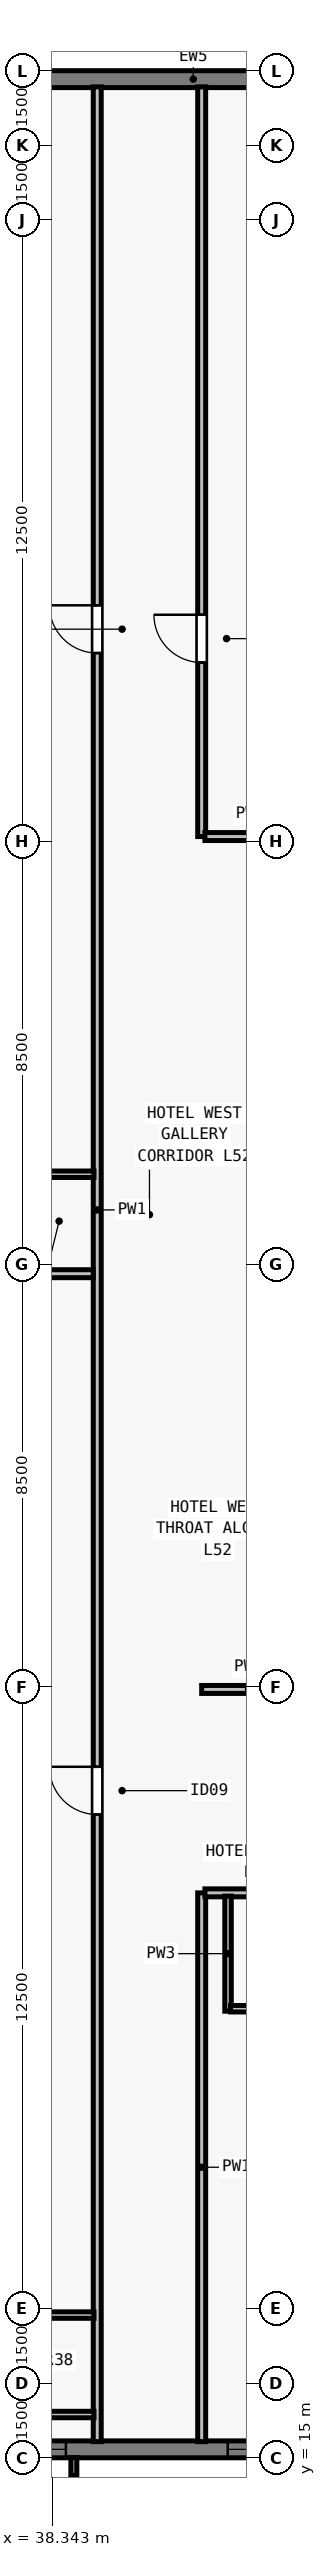
"""IFC4 building model, lengths in metres.
Left out: names, types, materials, properties, quantities, classifications, styles, units other than length and angle.
Written with IfcOpenShell. Run it as: python <this file> out.ifc"""

import sys

from ifc_helpers import new_model, si_unit, direction, frame, frame_2d, origin, place, context, subcontext, project, spatial, rectangle, extrude, element, fill, save


model = new_model("IFC4")
c1 = context("Model", 3, precision=1e-05, world=origin(), true_north=direction((0.0, 1.0)))
c2 = subcontext(c1, "Body", "Model", "MODEL_VIEW")
j1 = project(units=[si_unit("LENGTHUNIT", "METRE"), si_unit("PLANEANGLEUNIT", "RADIAN")], contexts=[c1])
p1 = place(None, origin())
s1 = spatial("IfcSite", under=j1, at=p1, CompositionType="ELEMENT")
p2 = place(p1, origin())
s2 = spatial("IfcBuilding", under=s1, at=p2, CompositionType="ELEMENT")
p3 = place(p2, frame((0.0, 0.0, 190.0)))
s3 = spatial("IfcBuildingStorey", under=s2, at=p3, CompositionType="ELEMENT", Elevation=190.0)
p4 = place(p3, frame((72.0, 15.17, 0.0), z_axis=(0.0, 0.0, 1.0), x_axis=(-1.0, 0.0, 0.0)))
e1 = element("IfcWall", 1, at=p4, inside=s3, PredefinedType="SOLIDWALL", context=c2, shape_type="SweptSolid", body=[
    extrude(rectangle(XDim=39.682, YDim=0.34, at=frame_2d((19.841, 0.0))), origin(), (0.0, 0.0, 1.0), 3.24),
])
p5 = place(p4, frame((4.502, 0.0, 0.8)))
e2 = element("IfcOpeningElement", 2, at=p5, cuts=e1, PredefinedType="OPENING", context=c2, shape_type="SweptSolid", body=[
    extrude(rectangle(XDim=1.35, YDim=1.62, at=frame_2d((0.675, 0.81))), frame((0.0, 0.18, 0.0), z_axis=(0.0, -1.0, 0.0), x_axis=(1.0, 0.0, 0.0)), (0.0, 0.0, 1.0), 0.36),
])
p6 = place(p4, frame((8.755, 0.0, 0.8)))
e3 = element("IfcOpeningElement", 3, at=p6, cuts=e1, PredefinedType="OPENING", context=c2, shape_type="SweptSolid", body=[
    extrude(rectangle(XDim=1.75, YDim=1.62, at=frame_2d((0.875, 0.81))), frame((0.0, 0.18, 0.0), z_axis=(0.0, -1.0, 0.0), x_axis=(1.0, 0.0, 0.0)), (0.0, 0.0, 1.0), 0.36),
])
p7 = place(p4, frame((12.059, 0.0, 0.8)))
e4 = element("IfcOpeningElement", 4, at=p7, cuts=e1, PredefinedType="OPENING", context=c2, shape_type="SweptSolid", body=[
    extrude(rectangle(XDim=1.35, YDim=1.62, at=frame_2d((0.675, 0.81))), frame((0.0, 0.18, 0.0), z_axis=(0.0, -1.0, 0.0), x_axis=(1.0, 0.0, 0.0)), (0.0, 0.0, 1.0), 0.36),
])
p8 = place(p4, frame((16.262, 0.0, 0.8)))
e5 = element("IfcOpeningElement", 5, at=p8, cuts=e1, PredefinedType="OPENING", context=c2, shape_type="SweptSolid", body=[
    extrude(rectangle(XDim=1.75, YDim=1.62, at=frame_2d((0.875, 0.81))), frame((0.0, 0.18, 0.0), z_axis=(0.0, -1.0, 0.0), x_axis=(1.0, 0.0, 0.0)), (0.0, 0.0, 1.0), 0.36),
])
p9 = place(p4, frame((20.016, 0.0, 0.8)))
e6 = element("IfcOpeningElement", 6, at=p9, cuts=e1, PredefinedType="OPENING", context=c2, shape_type="SweptSolid", body=[
    extrude(rectangle(XDim=1.35, YDim=1.62, at=frame_2d((0.675, 0.81))), frame((0.0, 0.18, 0.0), z_axis=(0.0, -1.0, 0.0), x_axis=(1.0, 0.0, 0.0)), (0.0, 0.0, 1.0), 0.36),
])
p10 = place(p4, frame((22.07, 0.0, 0.8)))
e7 = element("IfcOpeningElement", 7, at=p10, cuts=e1, PredefinedType="OPENING", context=c2, shape_type="SweptSolid", body=[
    extrude(rectangle(XDim=1.75, YDim=1.62, at=frame_2d((0.875, 0.81))), frame((0.0, 0.18, 0.0), z_axis=(0.0, -1.0, 0.0), x_axis=(1.0, 0.0, 0.0)), (0.0, 0.0, 1.0), 0.36),
])
p11 = place(p4, frame((26.273, 0.0, 0.8)))
e8 = element("IfcOpeningElement", 8, at=p11, cuts=e1, PredefinedType="OPENING", context=c2, shape_type="SweptSolid", body=[
    extrude(rectangle(XDim=1.35, YDim=1.62, at=frame_2d((0.675, 0.81))), frame((0.0, 0.18, 0.0), z_axis=(0.0, -1.0, 0.0), x_axis=(1.0, 0.0, 0.0)), (0.0, 0.0, 1.0), 0.36),
])
p12 = place(p4, frame((28.377, 0.0, 0.8)))
e9 = element("IfcOpeningElement", 9, at=p12, cuts=e1, PredefinedType="OPENING", context=c2, shape_type="SweptSolid", body=[
    extrude(rectangle(XDim=1.75, YDim=1.62, at=frame_2d((0.875, 0.81))), frame((0.0, 0.18, 0.0), z_axis=(0.0, -1.0, 0.0), x_axis=(1.0, 0.0, 0.0)), (0.0, 0.0, 1.0), 0.36),
])
p13 = place(p4, frame((33.38, 0.0, 0.8)))
e10 = element("IfcOpeningElement", 10, at=p13, cuts=e1, PredefinedType="OPENING", context=c2, shape_type="SweptSolid", body=[
    extrude(rectangle(XDim=1.35, YDim=1.62, at=frame_2d((0.675, 0.81))), frame((0.0, 0.18, 0.0), z_axis=(0.0, -1.0, 0.0), x_axis=(1.0, 0.0, 0.0)), (0.0, 0.0, 1.0), 0.36),
])
p14 = place(p3, frame((32.0, 62.83, 0.0), z_axis=(0.0, 0.0, 1.0), x_axis=(1.0, 0.0, 0.0)))
e11 = element("IfcWall", 11, at=p14, inside=s3, PredefinedType="SOLIDWALL", context=c2, shape_type="SweptSolid", body=[
    extrude(rectangle(XDim=39.682, YDim=0.34, at=frame_2d((19.841, 0.0))), origin(), (0.0, 0.0, 1.0), 3.24),
])
p15 = place(p14, frame((4.952, 0.0, 0.8)))
e12 = element("IfcOpeningElement", 12, at=p15, cuts=e11, PredefinedType="OPENING", context=c2, shape_type="SweptSolid", body=[
    extrude(rectangle(XDim=1.35, YDim=1.62, at=frame_2d((0.675, 0.81))), frame((0.0, 0.18, 0.0), z_axis=(0.0, -1.0, 0.0), x_axis=(1.0, 0.0, 0.0)), (0.0, 0.0, 1.0), 0.36),
])
p16 = place(p14, frame((12.059, 0.0, 0.8)))
e13 = element("IfcOpeningElement", 13, at=p16, cuts=e11, PredefinedType="OPENING", context=c2, shape_type="SweptSolid", body=[
    extrude(rectangle(XDim=1.35, YDim=1.62, at=frame_2d((0.675, 0.81))), frame((0.0, 0.18, 0.0), z_axis=(0.0, -1.0, 0.0), x_axis=(1.0, 0.0, 0.0)), (0.0, 0.0, 1.0), 0.36),
])
p17 = place(p14, frame((16.262, 0.0, 0.8)))
e14 = element("IfcOpeningElement", 14, at=p17, cuts=e11, PredefinedType="OPENING", context=c2, shape_type="SweptSolid", body=[
    extrude(rectangle(XDim=1.75, YDim=1.62, at=frame_2d((0.875, 0.81))), frame((0.0, 0.18, 0.0), z_axis=(0.0, -1.0, 0.0), x_axis=(1.0, 0.0, 0.0)), (0.0, 0.0, 1.0), 0.36),
])
p18 = place(p14, frame((19.166, 0.0, 0.8)))
e15 = element("IfcOpeningElement", 15, at=p18, cuts=e11, PredefinedType="OPENING", context=c2, shape_type="SweptSolid", body=[
    extrude(rectangle(XDim=1.35, YDim=1.62, at=frame_2d((0.675, 0.81))), frame((0.0, 0.18, 0.0), z_axis=(0.0, -1.0, 0.0), x_axis=(1.0, 0.0, 0.0)), (0.0, 0.0, 1.0), 0.36),
])
p19 = place(p14, frame((22.07, 0.0, 0.8)))
e16 = element("IfcOpeningElement", 16, at=p19, cuts=e11, PredefinedType="OPENING", context=c2, shape_type="SweptSolid", body=[
    extrude(rectangle(XDim=1.75, YDim=1.62, at=frame_2d((0.875, 0.81))), frame((0.0, 0.18, 0.0), z_axis=(0.0, -1.0, 0.0), x_axis=(1.0, 0.0, 0.0)), (0.0, 0.0, 1.0), 0.36),
])
p20 = place(p14, frame((26.273, 0.0, 0.8)))
e17 = element("IfcOpeningElement", 17, at=p20, cuts=e11, PredefinedType="OPENING", context=c2, shape_type="SweptSolid", body=[
    extrude(rectangle(XDim=1.35, YDim=1.62, at=frame_2d((0.675, 0.81))), frame((0.0, 0.18, 0.0), z_axis=(0.0, -1.0, 0.0), x_axis=(1.0, 0.0, 0.0)), (0.0, 0.0, 1.0), 0.36),
])
p21 = place(p14, frame((29.177, 0.0, 0.8)))
e18 = element("IfcOpeningElement", 18, at=p21, cuts=e11, PredefinedType="OPENING", context=c2, shape_type="SweptSolid", body=[
    extrude(rectangle(XDim=1.75, YDim=1.62, at=frame_2d((0.875, 0.81))), frame((0.0, 0.18, 0.0), z_axis=(0.0, -1.0, 0.0), x_axis=(1.0, 0.0, 0.0)), (0.0, 0.0, 1.0), 0.36),
])
p22 = place(p14, frame((34.23, 0.0, 0.8)))
e19 = element("IfcOpeningElement", 19, at=p22, cuts=e11, PredefinedType="OPENING", context=c2, shape_type="SweptSolid", body=[
    extrude(rectangle(XDim=1.35, YDim=1.62, at=frame_2d((0.675, 0.81))), frame((0.0, 0.18, 0.0), z_axis=(0.0, -1.0, 0.0), x_axis=(1.0, 0.0, 0.0)), (0.0, 0.0, 1.0), 0.36),
])
p23 = place(p3, frame((39.25, 15.325, 0.0), z_axis=(0.0, 0.0, 1.0), x_axis=(0.0, 1.0, 0.0)))
e20 = element("IfcWall", 20, at=p23, inside=s3, PredefinedType="PARTITIONING", context=c2, shape_type="SweptSolid", body=[
    extrude(rectangle(XDim=47.35, YDim=0.16, at=frame_2d((23.675, 0.0))), origin(), (0.0, 0.0, 1.0), 2.515),
])
p24 = place(p23, frame((12.61, 0.0, 0.0)))
e21 = element("IfcOpeningElement", 21, at=p24, cuts=e20, PredefinedType="OPENING", context=c2, shape_type="SweptSolid", body=[
    extrude(rectangle(XDim=0.96, YDim=2.15, at=frame_2d((0.48, 1.075))), frame((0.0, 0.09, 0.0), z_axis=(0.0, -1.0, 0.0), x_axis=(1.0, 0.0, 0.0)), (0.0, 0.0, 1.0), 0.18),
])
p25 = place(p23, frame((35.965, 0.0, 0.0)))
e22 = element("IfcOpeningElement", 22, at=p25, cuts=e20, PredefinedType="OPENING", context=c2, shape_type="SweptSolid", body=[
    extrude(rectangle(XDim=0.96, YDim=2.15, at=frame_2d((0.48, 1.075))), frame((0.0, 0.09, 0.0), z_axis=(0.0, -1.0, 0.0), x_axis=(1.0, 0.0, 0.0)), (0.0, 0.0, 1.0), 0.18),
])
p26 = place(p3, frame((41.35, 15.325, 0.0), z_axis=(0.0, 0.0, 1.0), x_axis=(0.0, 1.0, 0.0)))
e23 = element("IfcWall", 23, at=p26, inside=s3, PredefinedType="PARTITIONING", context=c2, shape_type="SweptSolid", body=[
    extrude(rectangle(XDim=11.035, YDim=0.16, at=frame_2d((5.518, 0.0))), origin(), (0.0, 0.0, 1.0), 3.24),
])
p27 = place(p3, frame((41.35, 47.6, 0.0), z_axis=(0.0, 0.0, 1.0), x_axis=(0.0, 1.0, 0.0)))
e24 = element("IfcWall", 24, at=p27, inside=s3, PredefinedType="PARTITIONING", context=c2, shape_type="SweptSolid", body=[
    extrude(rectangle(XDim=15.075, YDim=0.16, at=frame_2d((7.538, 0.0))), origin(), (0.0, 0.0, 1.0), 2.515),
])
p28 = place(p27, frame((3.5, 0.0, 0.0)))
e25 = element("IfcOpeningElement", 25, at=p28, cuts=e24, PredefinedType="OPENING", context=c2, shape_type="SweptSolid", body=[
    extrude(rectangle(XDim=0.96, YDim=2.12, at=frame_2d((0.48, 1.06))), frame((0.0, 0.09, 0.0), z_axis=(0.0, -1.0, 0.0), x_axis=(1.0, 0.0, 0.0)), (0.0, 0.0, 1.0), 0.18),
])
p29 = place(p3, frame((41.35, 30.45, 0.0), z_axis=(0.0, 0.0, 1.0), x_axis=(1.0, 0.0, 0.0)))
e26 = element("IfcWall", 26, at=p29, inside=s3, PredefinedType="PARTITIONING", context=c2, shape_type="SweptSolid", body=[
    extrude(rectangle(XDim=1.885, YDim=0.16, at=frame_2d((0.942, 0.0))), origin(), (0.0, 0.0, 1.0), 3.24),
])
p30 = place(p3, frame((41.415, 47.6, 0.0), z_axis=(0.0, 0.0, 1.0), x_axis=(1.0, 0.0, 0.0)))
e27 = element("IfcWall", 27, at=p30, inside=s3, PredefinedType="PARTITIONING", context=c2, shape_type="SweptSolid", body=[
    extrude(rectangle(XDim=1.82, YDim=0.16, at=frame_2d((0.91, 0.0))), origin(), (0.0, 0.0, 1.0), 3.24),
])
p31 = place(p3, frame((41.415, 26.36, 0.0), z_axis=(0.0, 0.0, 1.0), x_axis=(1.0, 0.0, 0.0)))
e28 = element("IfcWall", 28, at=p31, inside=s3, PredefinedType="PARTITIONING", context=c2, shape_type="SweptSolid", body=[
    extrude(rectangle(XDim=22.07, YDim=0.16, at=frame_2d((11.035, 0.0))), origin(), (0.0, 0.0, 1.0), 3.24),
])
p32 = place(p31, frame((3.331, 0.0, 0.0)))
e29 = element("IfcOpeningElement", 29, at=p32, cuts=e28, PredefinedType="OPENING", context=c2, shape_type="SweptSolid", body=[
    extrude(rectangle(XDim=0.96, YDim=2.15, at=frame_2d((0.48, 1.075))), frame((0.0, 0.09, 0.0), z_axis=(0.0, -1.0, 0.0), x_axis=(1.0, 0.0, 0.0)), (0.0, 0.0, 1.0), 0.18),
])
p33 = place(p31, frame((8.83, 0.0, 0.0)))
e30 = element("IfcOpeningElement", 30, at=p33, cuts=e28, PredefinedType="OPENING", context=c2, shape_type="SweptSolid", body=[
    extrude(rectangle(XDim=0.96, YDim=2.15, at=frame_2d((0.48, 1.075))), frame((0.0, 0.09, 0.0), z_axis=(0.0, -1.0, 0.0), x_axis=(1.0, 0.0, 0.0)), (0.0, 0.0, 1.0), 0.18),
])
p34 = place(p31, frame((14.192, 0.0, 0.0)))
e31 = element("IfcOpeningElement", 31, at=p34, cuts=e28, PredefinedType="OPENING", context=c2, shape_type="SweptSolid", body=[
    extrude(rectangle(XDim=0.96, YDim=2.15, at=frame_2d((0.48, 1.075))), frame((0.0, 0.09, 0.0), z_axis=(0.0, -1.0, 0.0), x_axis=(1.0, 0.0, 0.0)), (0.0, 0.0, 1.0), 0.18),
])
p35 = place(p31, frame((19.735, 0.0, 0.0)))
e32 = element("IfcOpeningElement", 32, at=p35, cuts=e28, PredefinedType="OPENING", context=c2, shape_type="SweptSolid", body=[
    extrude(rectangle(XDim=0.96, YDim=2.15, at=frame_2d((0.48, 1.075))), frame((0.0, 0.09, 0.0), z_axis=(0.0, -1.0, 0.0), x_axis=(1.0, 0.0, 0.0)), (0.0, 0.0, 1.0), 0.18),
])
p36 = place(p3, frame((41.88, 23.98, 0.0), z_axis=(0.0, 0.0, 1.0), x_axis=(0.0, 1.0, 0.0)))
e33 = element("IfcWall", 33, at=p36, inside=s3, PredefinedType="PLUMBINGWALL", context=c2, shape_type="SweptSolid", body=[
    extrude(rectangle(XDim=2.315, YDim=0.13, at=frame_2d((1.157, 0.0))), origin(), (0.0, 0.0, 1.0), 3.24),
])
p37 = place(p3, frame((41.93, 24.03, 0.0), z_axis=(0.0, 0.0, 1.0), x_axis=(1.0, 0.0, 0.0)))
e34 = element("IfcWall", 34, at=p37, inside=s3, PredefinedType="PLUMBINGWALL", context=c2, shape_type="SweptSolid", body=[
    extrude(rectangle(XDim=1.674, YDim=0.13, at=frame_2d((0.837, 0.0))), origin(), (0.0, 0.0, 1.0), 3.24),
])
p38 = place(p37, frame((0.427, 0.0, 0.0)))
e35 = element("IfcOpeningElement", 35, at=p38, cuts=e34, PredefinedType="OPENING", context=c2, shape_type="SweptSolid", body=[
    extrude(rectangle(XDim=0.82, YDim=2.1, at=frame_2d((0.41, 1.05))), frame((0.0, 0.075, 0.0), z_axis=(0.0, -1.0, 0.0), x_axis=(1.0, 0.0, 0.0)), (0.0, 0.0, 1.0), 0.15),
])
for number, where, z_axis, x_axis in (
    (36, (36.87, 15.87, 0.0), (0.0, 0.0, 1.0), (1.0, 0.0, 0.0)),
    (37, (36.87, 17.87, 0.0), (0.0, 0.0, 1.0), (1.0, 0.0, 0.0)),
):
    element("IfcWall", number, at=place(p3, frame(where, z_axis=z_axis, x_axis=x_axis)), inside=s3, PredefinedType="PLUMBINGWALL", context=c2, shape_type="SweptSolid", body=[
        extrude(rectangle(XDim=2.315, YDim=0.13, at=frame_2d((1.157, 0.0))), origin(), (0.0, 0.0, 1.0), 3.24),
    ])
p39 = place(p3, frame((28.325, 38.81, 0.0), z_axis=(0.0, 0.0, 1.0), x_axis=(1.0, 0.0, 0.0)))
e38 = element("IfcWall", 38, at=p39, inside=s3, PredefinedType="PARTITIONING", context=c2, shape_type="SweptSolid", body=[
    extrude(rectangle(XDim=10.845, YDim=0.16, at=frame_2d((5.422, 0.0))), origin(), (0.0, 0.0, 1.0), 2.856),
])
p40 = place(p3, frame((36.87, 40.81, 0.0), z_axis=(0.0, 0.0, 1.0), x_axis=(1.0, 0.0, 0.0)))
e39 = element("IfcWall", 39, at=p40, inside=s3, PredefinedType="PLUMBINGWALL", context=c2, shape_type="SweptSolid", body=[
    extrude(rectangle(XDim=2.315, YDim=0.13, at=frame_2d((1.157, 0.0))), origin(), (0.0, 0.0, 1.0), 3.24),
])
p41 = place(p12, origin())
e40 = element("IfcWindow", 40, at=p41, inside=s3, PartitioningType="SINGLE_PANEL", PredefinedType="WINDOW", context=c2, shape_type="SweptSolid", body=[
    extrude(rectangle(XDim=1.75, YDim=1.62, at=frame_2d((0.875, 0.81))), frame((0.0, -0.05, 0.0), z_axis=(0.0, -1.0, 0.0), x_axis=(1.0, 0.0, 0.0)), (0.0, 0.0, 1.0), 0.06),
])
fill(e9, e40)
p42 = place(p13, origin())
e41 = element("IfcWindow", 41, at=p42, inside=s3, PartitioningType="SINGLE_PANEL", PredefinedType="WINDOW", context=c2, shape_type="SweptSolid", body=[
    extrude(rectangle(XDim=1.35, YDim=1.62, at=frame_2d((0.675, 0.81))), frame((0.0, -0.05, 0.0), z_axis=(0.0, -1.0, 0.0), x_axis=(1.0, 0.0, 0.0)), (0.0, 0.0, 1.0), 0.06),
])
fill(e10, e41)
p43 = place(p28, origin())
e42 = element("IfcDoor", 42, at=p43, inside=s3, OperationType="SINGLE_SWING_RIGHT", PredefinedType="DOOR", context=c2, shape_type="SweptSolid", body=[
    extrude(rectangle(XDim=0.96, YDim=2.12, at=frame_2d((0.48, 1.06))), frame((0.0, 0.025, 0.0), z_axis=(0.0, -1.0, 0.0), x_axis=(1.0, 0.0, 0.0)), (0.0, 0.0, 1.0), 0.05),
])
fill(e25, e42)
p44 = place(p24, origin())
e43 = element("IfcDoor", 43, at=p44, inside=s3, OperationType="SINGLE_SWING_RIGHT", PredefinedType="DOOR", context=c2, shape_type="SweptSolid", body=[
    extrude(rectangle(XDim=0.96, YDim=2.15, at=frame_2d((0.48, 1.075))), frame((0.0, 0.025, 0.0), z_axis=(0.0, -1.0, 0.0), x_axis=(1.0, 0.0, 0.0)), (0.0, 0.0, 1.0), 0.05),
])
fill(e21, e43)
p45 = place(p25, origin())
e44 = element("IfcDoor", 44, at=p45, inside=s3, OperationType="SINGLE_SWING_RIGHT", PredefinedType="DOOR", context=c2, shape_type="SweptSolid", body=[
    extrude(rectangle(XDim=0.96, YDim=2.15, at=frame_2d((0.48, 1.075))), frame((0.0, 0.025, 0.0), z_axis=(0.0, -1.0, 0.0), x_axis=(1.0, 0.0, 0.0)), (0.0, 0.0, 1.0), 0.05),
])
fill(e22, e44)
save(model, sys.argv[1])
